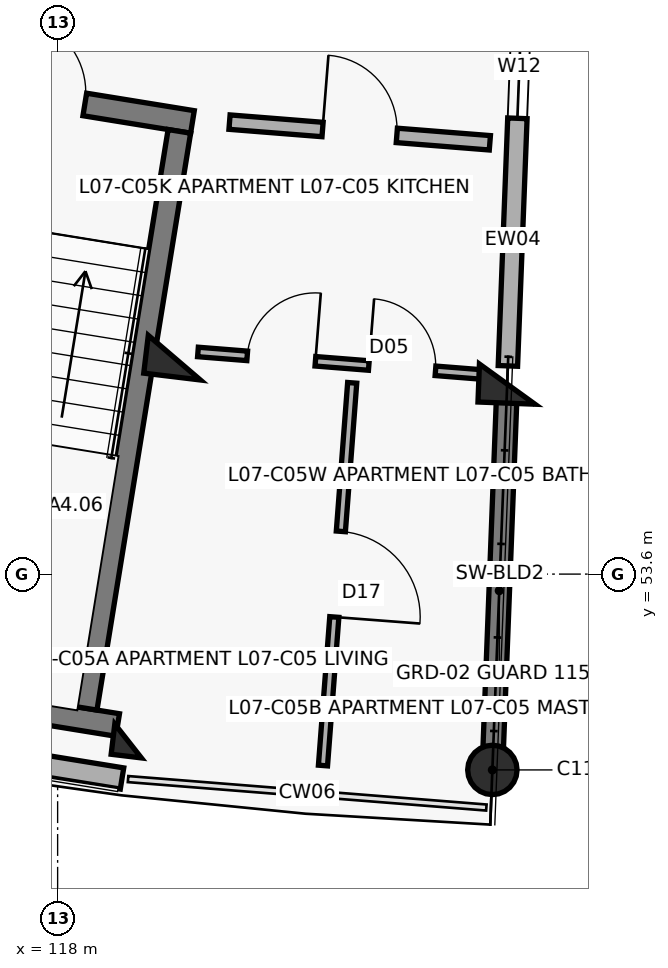
"""IFC4 building model, lengths in metres.
Left out: names, types, materials, properties, quantities, classifications, styles, units other than length and angle.
Written with IfcOpenShell. Run it as: python <this file> out.ifc"""

import sys

from ifc_helpers import new_model, si_unit, direction, frame, frame_2d, origin, origin_2d, place, context, subcontext, project, spatial, rectangle, circle, extrude, element, fill, save


model = new_model("IFC4")
c1 = context("Model", 3, precision=1e-05, world=origin(), true_north=direction((0.0, 1.0)))
c2 = subcontext(c1, "Body", "Model", "MODEL_VIEW")
j1 = project(units=[si_unit("LENGTHUNIT", "METRE"), si_unit("PLANEANGLEUNIT", "RADIAN")], contexts=[c1])
p1 = place(None, origin())
s1 = spatial("IfcSite", under=j1, at=p1, CompositionType="ELEMENT")
p2 = place(p1, origin())
s2 = spatial("IfcBuilding", under=s1, at=p2, CompositionType="ELEMENT")
p3 = place(p2, frame((0.0, 0.0, 23.6)))
s3 = spatial("IfcBuildingStorey", under=s2, at=p3, CompositionType="ELEMENT", Elevation=23.6)
p4 = place(p3, frame((119.535, 56.448, 0.0), z_axis=(0.0, 0.0, 1.0), x_axis=(-0.119790293837, -0.992799217114, 0.0)))
e1 = element("IfcColumn", 1, at=p4, inside=s3, PredefinedType="COLUMN", context=c2, shape_type="SweptSolid", body=[
    extrude(rectangle(XDim=0.5, YDim=0.75, at=origin_2d()), origin(), (0.0, 0.0, 1.0), 3.1),
])
p5 = place(p3, frame((118.927, 51.404, 0.0), z_axis=(0.0, 0.0, 1.0), x_axis=(-0.119790293837, -0.992799217114, 0.0)))
e2 = element("IfcColumn", 2, at=p5, inside=s3, PredefinedType="COLUMN", context=c2, shape_type="SweptSolid", body=[
    extrude(rectangle(XDim=0.4, YDim=0.4, at=origin_2d()), origin(), (0.0, 0.0, 1.0), 3.1),
])
p6 = place(p3, frame((123.915, 56.1, 0.0), z_axis=(0.0, 0.0, 1.0), x_axis=(-0.038387809088, -0.999262916411, 0.0)))
e3 = element("IfcColumn", 3, at=p6, inside=s3, PredefinedType="COLUMN", context=c2, shape_type="SweptSolid", body=[
    extrude(rectangle(XDim=0.5, YDim=0.75, at=origin_2d()), origin(), (0.0, 0.0, 1.0), 3.1),
])
p7 = place(p3, frame((123.72, 51.023, 0.0), z_axis=(0.0, 0.0, 1.0), x_axis=(-0.038387809088, -0.999262916411, 0.0)))
e4 = element("IfcColumn", 4, at=p7, inside=s3, PredefinedType="COLUMN", context=c2, shape_type="SweptSolid", body=[
    extrude(circle(Radius=0.325, at=origin_2d()), origin(), (0.0, 0.0, 1.0), 3.1),
])
p8 = place(p3, frame((123.908, 55.92, 0.0), z_axis=(0.0, 0.0, 1.0), x_axis=(-0.038381471406, -0.99926315986, 0.0)))
e5 = element("IfcWall", 5, at=p8, inside=s3, PredefinedType="SHEAR", context=c2, shape_type="SweptSolid", body=[
    extrude(rectangle(XDim=4.72, YDim=0.27, at=frame_2d((2.36, 0.0))), origin(), (0.0, 0.0, 1.0), 2.86),
])
p9 = place(p3, frame((114.1, 51.681, 0.0), z_axis=(0.0, 0.0, 1.0), x_axis=(0.987080750493, -0.160223568819, 0.0)))
e6 = element("IfcWall", 6, at=p9, inside=s3, PredefinedType="SOLIDWALL", context=c2, shape_type="SweptSolid", body=[
    extrude(rectangle(XDim=4.809, YDim=0.282, at=frame_2d((2.404, 0.0))), origin(), (0.0, 0.0, 1.0), 2.25),
])
p10 = place(p3, frame((124.131, 61.736, 0.0), z_axis=(0.0, 0.0, 1.0), x_axis=(-0.038429649442, -0.999261308189, 0.0)))
e7 = element("IfcWall", 7, at=p10, inside=s3, PredefinedType="SOLIDWALL", context=c2, shape_type="SweptSolid", body=[
    extrude(rectangle(XDim=5.4, YDim=0.255, at=frame_2d((2.7, 0.0))), origin(), (0.0, 0.0, 1.0), 2.18),
])
p11 = place(p10, frame((0.79, 0.0, 0.75)))
e8 = element("IfcOpeningElement", 8, at=p11, cuts=e7, PredefinedType="OPENING", context=c2, shape_type="SweptSolid", body=[
    extrude(rectangle(XDim=1.35, YDim=1.35, at=frame_2d((0.675, 0.675))), frame((0.0, 0.137, 0.0), z_axis=(0.0, -1.0, 0.0), x_axis=(1.0, 0.0, 0.0)), (0.0, 0.0, 1.0), 0.275),
])
p12 = place(p3, frame((115.954, 60.169, 0.0), z_axis=(0.0, 0.0, 1.0), x_axis=(0.987077443397, -0.160243941341, 0.0)))
e9 = element("IfcWall", 9, at=p12, inside=s3, PredefinedType="SHEAR", context=c2, shape_type="SweptSolid", body=[
    extrude(rectangle(XDim=3.87, YDim=0.3, at=frame_2d((1.935, 0.0))), origin(), (0.0, 0.0, 1.0), 3.1),
])
p13 = place(p12, frame((1.435, 0.0, 0.0)))
e10 = element("IfcOpeningElement", 10, at=p13, cuts=e9, PredefinedType="OPENING", context=c2, shape_type="SweptSolid", body=[
    extrude(rectangle(XDim=1.0, YDim=2.15, at=frame_2d((0.5, 1.075))), frame((0.0, 0.16, 0.0), z_axis=(0.0, -1.0, 0.0), x_axis=(1.0, 0.0, 0.0)), (0.0, 0.0, 1.0), 0.32),
])
p14 = place(p3, frame((114.377, 52.331, 0.0), z_axis=(0.0, 0.0, 1.0), x_axis=(0.987077474317, -0.16024375088, 0.0)))
e11 = element("IfcWall", 11, at=p14, inside=s3, PredefinedType="SHEAR", context=c2, shape_type="SweptSolid", body=[
    extrude(rectangle(XDim=4.47, YDim=0.3, at=frame_2d((2.235, 0.0))), origin(), (0.0, 0.0, 1.0), 3.1),
])
p15 = place(p3, frame((119.602, 59.425, 0.0), z_axis=(0.0, 0.0, 1.0), x_axis=(-0.160201584773, -0.987084318706, 0.0)))
e12 = element("IfcWall", 12, at=p15, inside=s3, PredefinedType="SHEAR", context=c2, shape_type="SweptSolid", body=[
    extrude(rectangle(XDim=7.69, YDim=0.3, at=frame_2d((3.845, 0.0))), origin(), (0.0, 0.0, 1.0), 3.1),
])
p16 = place(p3, frame((120.261, 59.547, 0.0), z_axis=(0.0, 0.0, 1.0), x_axis=(0.996862545573, -0.079152165058, 0.0)))
e13 = element("IfcWall", 13, at=p16, inside=s3, PredefinedType="SOLIDWALL", context=c2, shape_type="SweptSolid", body=[
    extrude(rectangle(XDim=3.436, YDim=0.19, at=frame_2d((1.718, 0.0))), origin(), (0.0, 0.0, 1.0), 2.08),
])
p17 = place(p16, frame((1.228, 0.0, 0.0)))
e14 = element("IfcOpeningElement", 14, at=p17, cuts=e13, PredefinedType="OPENING", context=c2, shape_type="SweptSolid", body=[
    extrude(rectangle(XDim=0.98, YDim=2.15, at=frame_2d((0.49, 1.075))), frame((0.0, 0.105, 0.0), z_axis=(0.0, -1.0, 0.0), x_axis=(1.0, 0.0, 0.0)), (0.0, 0.0, 1.0), 0.21),
])
p18 = place(p3, frame((119.846, 56.523, 0.0), z_axis=(0.0, 0.0, 1.0), x_axis=(0.996863292793, -0.079142753818, 0.0)))
e15 = element("IfcWall", 15, at=p18, inside=s3, PredefinedType="PARTITIONING", context=c2, shape_type="SweptSolid", body=[
    extrude(rectangle(XDim=3.785, YDim=0.125, at=frame_2d((1.893, 0.0))), origin(), (0.0, 0.0, 1.0), 2.08),
])
p19 = place(p18, frame((0.65, 0.0, 0.0)))
e16 = element("IfcOpeningElement", 16, at=p19, cuts=e15, PredefinedType="OPENING", context=c2, shape_type="SweptSolid", body=[
    extrude(rectangle(XDim=0.9, YDim=2.1, at=frame_2d((0.45, 1.05))), frame((0.0, 0.073, 0.0), z_axis=(0.0, -1.0, 0.0), x_axis=(1.0, 0.0, 0.0)), (0.0, 0.0, 1.0), 0.145),
])
p20 = place(p18, frame((2.255, 0.0, 0.0)))
e17 = element("IfcOpeningElement", 17, at=p20, cuts=e15, PredefinedType="OPENING", context=c2, shape_type="SweptSolid", body=[
    extrude(rectangle(XDim=0.88, YDim=2.1, at=frame_2d((0.44, 1.05))), frame((0.0, 0.073, 0.0), z_axis=(0.0, -1.0, 0.0), x_axis=(1.0, 0.0, 0.0)), (0.0, 0.0, 1.0), 0.145),
])
p21 = place(p3, frame((121.875, 56.116, 0.0), z_axis=(0.0, 0.0, 1.0), x_axis=(-0.076141951799, -0.997096987848, 0.0)))
e18 = element("IfcWall", 18, at=p21, inside=s3, PredefinedType="PARTITIONING", context=c2, shape_type="SweptSolid", body=[
    extrude(rectangle(XDim=5.05, YDim=0.12, at=frame_2d((2.525, 0.0))), origin(), (0.0, 0.0, 1.0), 2.08),
])
p22 = place(p21, frame((1.96, 0.0, 0.0)))
e19 = element("IfcOpeningElement", 19, at=p22, cuts=e18, PredefinedType="OPENING", context=c2, shape_type="SweptSolid", body=[
    extrude(rectangle(XDim=1.13, YDim=2.1, at=frame_2d((0.565, 1.05))), frame((0.0, 0.07, 0.0), z_axis=(0.0, -1.0, 0.0), x_axis=(1.0, 0.0, 0.0)), (0.0, 0.0, 1.0), 0.14),
])
p23 = place(p11, origin())
e20 = element("IfcWindow", 20, at=p23, inside=s3, PartitioningType="DOUBLE_PANEL_VERTICAL", PredefinedType="WINDOW", context=c2, shape_type="SweptSolid", body=[
    extrude(rectangle(XDim=1.35, YDim=1.35, at=frame_2d((0.675, 0.675))), frame((0.0, 0.03, 0.0), z_axis=(0.0, -1.0, 0.0), x_axis=(1.0, 0.0, 0.0)), (0.0, 0.0, 1.0), 0.06),
])
fill(e8, e20)
p24 = place(p13, origin())
e21 = element("IfcDoor", 21, at=p24, inside=s3, OperationType="SINGLE_SWING_LEFT", PredefinedType="DOOR", context=c2, shape_type="SweptSolid", body=[
    extrude(rectangle(XDim=1.0, YDim=2.15, at=frame_2d((0.5, 1.075))), frame((0.0, 0.025, 0.0), z_axis=(0.0, -1.0, 0.0), x_axis=(1.0, 0.0, 0.0)), (0.0, 0.0, 1.0), 0.05),
])
fill(e10, e21)
p25 = place(p17, origin())
e22 = element("IfcDoor", 22, at=p25, inside=s3, OperationType="SINGLE_SWING_LEFT", PredefinedType="DOOR", context=c2, shape_type="SweptSolid", body=[
    extrude(rectangle(XDim=0.98, YDim=2.15, at=frame_2d((0.49, 1.075))), frame((0.0, 0.025, 0.0), z_axis=(0.0, -1.0, 0.0), x_axis=(1.0, 0.0, 0.0)), (0.0, 0.0, 1.0), 0.05),
])
fill(e14, e22)
p26 = place(p19, origin())
e23 = element("IfcDoor", 23, at=p26, inside=s3, OperationType="SINGLE_SWING_RIGHT", PredefinedType="DOOR", context=c2, shape_type="SweptSolid", body=[
    extrude(rectangle(XDim=0.9, YDim=2.1, at=frame_2d((0.45, 1.05))), frame((0.0, 0.025, 0.0), z_axis=(0.0, -1.0, 0.0), x_axis=(1.0, 0.0, 0.0)), (0.0, 0.0, 1.0), 0.05),
])
fill(e16, e23)
p27 = place(p20, origin())
e24 = element("IfcDoor", 24, at=p27, inside=s3, OperationType="SINGLE_SWING_LEFT", PredefinedType="DOOR", context=c2, shape_type="SweptSolid", body=[
    extrude(rectangle(XDim=0.88, YDim=2.1, at=frame_2d((0.44, 1.05))), frame((0.0, 0.025, 0.0), z_axis=(0.0, -1.0, 0.0), x_axis=(1.0, 0.0, 0.0)), (0.0, 0.0, 1.0), 0.05),
])
fill(e17, e24)
p28 = place(p22, origin())
e25 = element("IfcDoor", 25, at=p28, inside=s3, OperationType="SINGLE_SWING_RIGHT", PredefinedType="DOOR", context=c2, shape_type="SweptSolid", body=[
    extrude(rectangle(XDim=1.13, YDim=2.1, at=frame_2d((0.565, 1.05))), frame((0.0, 0.025, 0.0), z_axis=(0.0, -1.0, 0.0), x_axis=(1.0, 0.0, 0.0)), (0.0, 0.0, 1.0), 0.05),
])
fill(e19, e25)
save(model, sys.argv[1])
